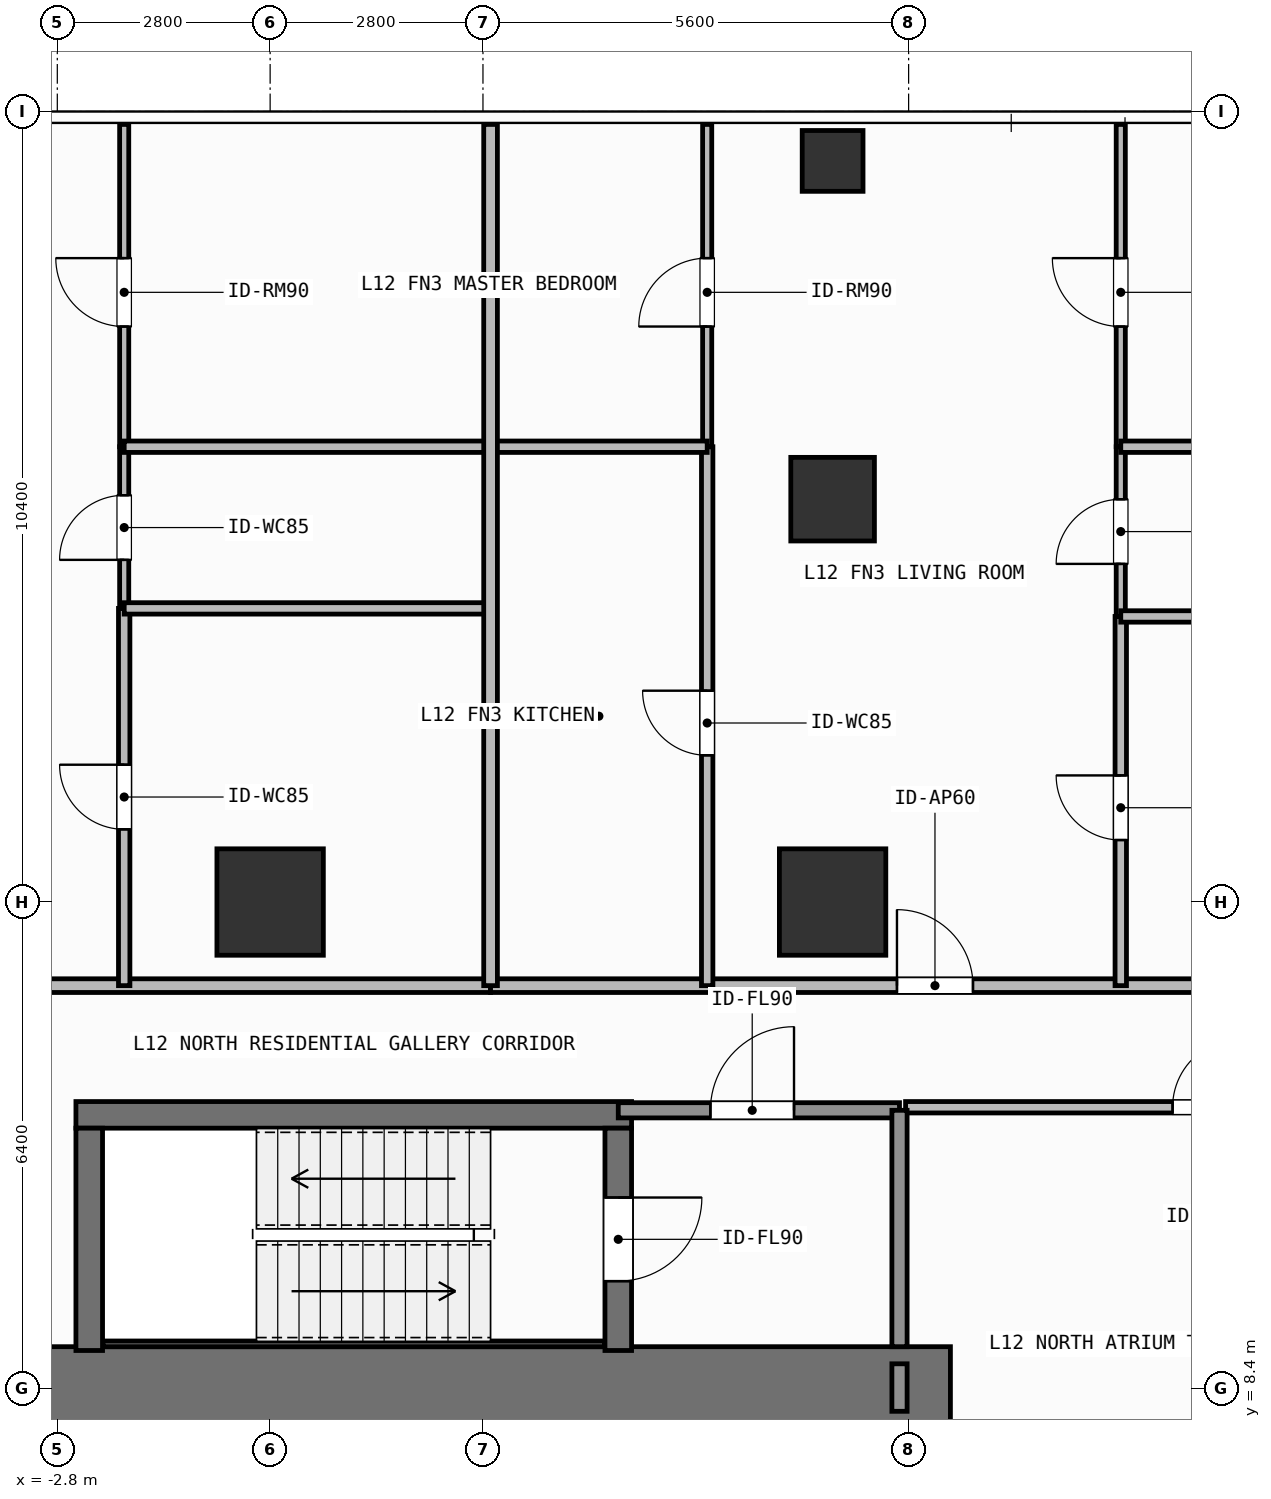
"""IFC4 building model, lengths in metres.
Left out: names, types, materials, properties, quantities, classifications, styles, units other than length and angle.
Written with IfcOpenShell. Run it as: python <this file> out.ifc"""

import sys

from ifc_helpers import new_model, si_unit, direction, frame, frame_2d, origin, origin_2d, place, context, subcontext, project, spatial, rectangle, hollow_rectangle, extrude, element, fill, save


model = new_model("IFC4")
c1 = context("Model", 3, precision=1e-05, world=origin(), true_north=direction((0.0, 1.0)))
c2 = subcontext(c1, "Body", "Model", "MODEL_VIEW")
j1 = project(units=[si_unit("LENGTHUNIT", "METRE"), si_unit("PLANEANGLEUNIT", "RADIAN")], contexts=[c1])
p1 = place(None, origin())
s1 = spatial("IfcSite", under=j1, at=p1, CompositionType="ELEMENT")
p2 = place(p1, origin())
s2 = spatial("IfcBuilding", under=s1, at=p2, CompositionType="ELEMENT")
p3 = place(p2, frame((0.0, 0.0, 46.2)))
s3 = spatial("IfcBuildingStorey", under=s2, at=p3, CompositionType="ELEMENT", Elevation=46.2)
p4 = place(p3, frame((-7.55, 8.4, 0.0), z_axis=(0.0, 0.0, 1.0), x_axis=(1.0, 0.0, 0.0)))
e1 = element("IfcWall", 1, at=p4, inside=s3, PredefinedType="SHEAR", context=c2, shape_type="SweptSolid", body=[
    extrude(rectangle(XDim=16.5, YDim=1.1, at=frame_2d((8.25, 0.0))), origin(), (0.0, 0.0, 1.0), 3.9),
])
p5 = place(p3, frame((-2.555, 12.0, 0.0), z_axis=(0.0, 0.0, 1.0), x_axis=(1.0, 0.0, 0.0)))
e2 = element("IfcWall", 2, at=p5, inside=s3, PredefinedType="SHEAR", context=c2, shape_type="SweptSolid", body=[
    extrude(rectangle(XDim=7.31, YDim=0.35, at=frame_2d((3.655, 0.0))), origin(), (0.0, 0.0, 1.0), 3.9),
])
p6 = place(p3, frame((-2.2, 8.988, 0.0), z_axis=(0.0, 0.0, 1.0), x_axis=(1.0, 0.0, 0.0)))
e3 = element("IfcWall", 3, at=p6, inside=s3, PredefinedType="SHEAR", context=c2, shape_type="SweptSolid", body=[
    extrude(rectangle(XDim=6.6, YDim=0.075, at=frame_2d((3.3, 0.0))), origin(), (0.0, 0.0, 1.0), 3.9),
])
p7 = place(p3, frame((-2.38, 8.9, 0.0), z_axis=(0.0, 0.0, 1.0), x_axis=(0.0, 1.0, 0.0)))
e4 = element("IfcWall", 4, at=p7, inside=s3, PredefinedType="SHEAR", context=c2, shape_type="SweptSolid", body=[
    extrude(rectangle(XDim=2.925, YDim=0.35, at=frame_2d((1.462, 0.0))), origin(), (0.0, 0.0, 1.0), 3.9),
])
p8 = place(p3, frame((4.58, 11.825, 0.0), z_axis=(0.0, 0.0, 1.0), x_axis=(0.0, -1.0, 0.0)))
e5 = element("IfcWall", 5, at=p8, inside=s3, PredefinedType="SHEAR", context=c2, shape_type="SweptSolid", body=[
    extrude(rectangle(XDim=2.925, YDim=0.35, at=frame_2d((1.462, 0.0))), origin(), (0.0, 0.0, 1.0), 3.9),
])
p9 = place(p8, frame((0.913, 0.0, 0.0)))
e6 = element("IfcOpeningElement", 6, at=p9, cuts=e5, PredefinedType="OPENING", context=c2, shape_type="SweptSolid", body=[
    extrude(rectangle(XDim=1.1, YDim=2.15, at=frame_2d((0.55, 1.075))), frame((0.0, 0.185, 0.0), z_axis=(0.0, -1.0, 0.0), x_axis=(1.0, 0.0, 0.0)), (0.0, 0.0, 1.0), 0.37),
])
for number, where, z_axis, x_axis in (
    (7, (0.0, 14.8, 0.0), (0.0, 0.0, 1.0), (1.0, 0.0, 0.0)),
    (8, (7.4, 14.8, 0.0), (0.0, 0.0, 1.0), (1.0, 0.0, 0.0)),
):
    element("IfcColumn", number, at=place(p3, frame(where, z_axis=z_axis, x_axis=x_axis)), inside=s3, PredefinedType="COLUMN", context=c2, shape_type="SweptSolid", body=[
        extrude(rectangle(XDim=1.4, YDim=1.4, at=origin_2d()), origin(), (0.0, 0.0, 1.0), 3.9),
    ])
p10 = place(p3, frame((7.4, 20.1, 0.0), z_axis=(0.0, 0.0, 1.0), x_axis=(1.0, 0.0, 0.0)))
e9 = element("IfcColumn", 9, at=p10, inside=s3, PredefinedType="COLUMN", context=c2, shape_type="SweptSolid", body=[
    extrude(rectangle(XDim=1.1, YDim=1.1, at=origin_2d()), origin(), (0.0, 0.0, 1.0), 3.9),
])
p11 = place(p3, frame((7.4, 24.55, 0.0), z_axis=(0.0, 0.0, 1.0), x_axis=(1.0, 0.0, 0.0)))
e10 = element("IfcColumn", 10, at=p11, inside=s3, PredefinedType="COLUMN", context=c2, shape_type="SweptSolid", body=[
    extrude(hollow_rectangle(XDim=0.8, YDim=0.8, WallThickness=0.036, at=origin_2d()), origin(), (0.0, 0.0, 1.0), 3.9),
])
p12 = place(p3, frame((4.58, 12.06, 0.0), z_axis=(0.0, 0.0, 1.0), x_axis=(1.0, 0.0, 0.0)))
e11 = element("IfcWall", 11, at=p12, inside=s3, PredefinedType="SOLIDWALL", context=c2, shape_type="SweptSolid", body=[
    extrude(rectangle(XDim=3.7, YDim=0.2, at=frame_2d((1.85, 0.0))), origin(), (0.0, 0.0, 1.0), 3.68),
])
p13 = place(p12, frame((1.212, 0.0, 0.0)))
e12 = element("IfcOpeningElement", 12, at=p13, cuts=e11, PredefinedType="OPENING", context=c2, shape_type="SweptSolid", body=[
    extrude(rectangle(XDim=1.1, YDim=2.15, at=frame_2d((0.55, 1.075))), frame((0.0, 0.11, 0.0), z_axis=(0.0, -1.0, 0.0), x_axis=(1.0, 0.0, 0.0)), (0.0, 0.0, 1.0), 0.22),
])
p14 = place(p3, frame((8.36, 12.1, 0.0), z_axis=(0.0, 0.0, 1.0), x_axis=(1.0, 0.0, 0.0)))
e13 = element("IfcWall", 13, at=p14, inside=s3, PredefinedType="PARTITIONING", context=c2, shape_type="SweptSolid", body=[
    extrude(rectangle(XDim=7.22, YDim=0.15, at=frame_2d((3.61, 0.0))), origin(), (0.0, 0.0, 1.0), 3.68),
])
p15 = place(p14, frame((3.513, 0.0, 0.0)))
e14 = element("IfcOpeningElement", 14, at=p15, cuts=e13, PredefinedType="OPENING", context=c2, shape_type="SweptSolid", body=[
    extrude(rectangle(XDim=0.9, YDim=2.1, at=frame_2d((0.45, 1.05))), frame((0.0, 0.085, 0.0), z_axis=(0.0, -1.0, 0.0), x_axis=(1.0, 0.0, 0.0)), (0.0, 0.0, 1.0), 0.17),
])
p16 = place(p3, frame((-9.151, 13.7, 0.0), z_axis=(0.0, 0.0, 1.0), x_axis=(1.0, 0.0, 0.0)))
e15 = element("IfcWall", 15, at=p16, inside=s3, PredefinedType="PARTITIONING", context=c2, shape_type="SweptSolid", body=[
    extrude(rectangle(XDim=12.051, YDim=0.18, at=frame_2d((6.025, 0.0))), origin(), (0.0, 0.0, 1.0), 3.68),
])
p17 = place(p16, frame((4.989, 0.0, 0.0)))
e16 = element("IfcOpeningElement", 16, at=p17, cuts=e15, PredefinedType="OPENING", context=c2, shape_type="SweptSolid", body=[
    extrude(rectangle(XDim=1.0, YDim=2.2, at=frame_2d((0.5, 1.1))), frame((0.0, 0.1, 0.0), z_axis=(0.0, -1.0, 0.0), x_axis=(1.0, 0.0, 0.0)), (0.0, 0.0, 1.0), 0.2),
])
p18 = place(p3, frame((-1.92, 13.7, 0.0), z_axis=(0.0, 0.0, 1.0), x_axis=(0.0, 1.0, 0.0)))
e17 = element("IfcWall", 17, at=p18, inside=s3, PredefinedType="PARTITIONING", context=c2, shape_type="SweptSolid", body=[
    extrude(rectangle(XDim=4.963, YDim=0.15, at=frame_2d((2.481, 0.0))), origin(), (0.0, 0.0, 1.0), 3.68),
])
p19 = place(p18, frame((2.056, 0.0, 0.0)))
e18 = element("IfcOpeningElement", 18, at=p19, cuts=e17, PredefinedType="OPENING", context=c2, shape_type="SweptSolid", body=[
    extrude(rectangle(XDim=0.85, YDim=2.1, at=frame_2d((0.425, 1.05))), frame((0.0, 0.085, 0.0), z_axis=(0.0, -1.0, 0.0), x_axis=(1.0, 0.0, 0.0)), (0.0, 0.0, 1.0), 0.17),
])
p20 = place(p3, frame((-1.92, 18.663, 0.0), z_axis=(0.0, 0.0, 1.0), x_axis=(0.0, 1.0, 0.0)))
e19 = element("IfcWall", 19, at=p20, inside=s3, PredefinedType="PARTITIONING", context=c2, shape_type="SweptSolid", body=[
    extrude(rectangle(XDim=2.127, YDim=0.12, at=frame_2d((1.063, 0.0))), origin(), (0.0, 0.0, 1.0), 3.68),
])
p21 = place(p20, frame((0.638, 0.0, 0.0)))
e20 = element("IfcOpeningElement", 20, at=p21, cuts=e19, PredefinedType="OPENING", context=c2, shape_type="SweptSolid", body=[
    extrude(rectangle(XDim=0.85, YDim=2.1, at=frame_2d((0.425, 1.05))), frame((0.0, 0.07, 0.0), z_axis=(0.0, -1.0, 0.0), x_axis=(1.0, 0.0, 0.0)), (0.0, 0.0, 1.0), 0.14),
])
p22 = place(p3, frame((-1.92, 20.79, 0.0), z_axis=(0.0, 0.0, 1.0), x_axis=(0.0, 1.0, 0.0)))
e21 = element("IfcWall", 21, at=p22, inside=s3, PredefinedType="PARTITIONING", context=c2, shape_type="SweptSolid", body=[
    extrude(rectangle(XDim=4.24, YDim=0.12, at=frame_2d((2.12, 0.0))), origin(), (0.0, 0.0, 1.0), 3.68),
])
p23 = place(p22, frame((1.581, 0.0, 0.0)))
e22 = element("IfcOpeningElement", 22, at=p23, cuts=e21, PredefinedType="OPENING", context=c2, shape_type="SweptSolid", body=[
    extrude(rectangle(XDim=0.9, YDim=2.1, at=frame_2d((0.45, 1.05))), frame((0.0, 0.07, 0.0), z_axis=(0.0, -1.0, 0.0), x_axis=(1.0, 0.0, 0.0)), (0.0, 0.0, 1.0), 0.14),
])
p24 = place(p3, frame((2.9, 13.7, 0.0), z_axis=(0.0, 0.0, 1.0), x_axis=(1.0, 0.0, 0.0)))
e23 = element("IfcWall", 23, at=p24, inside=s3, PredefinedType="PARTITIONING", context=c2, shape_type="SweptSolid", body=[
    extrude(rectangle(XDim=12.051, YDim=0.18, at=frame_2d((6.025, 0.0))), origin(), (0.0, 0.0, 1.0), 3.68),
])
p25 = place(p24, frame((5.347, 0.0, 0.0)))
e24 = element("IfcOpeningElement", 24, at=p25, cuts=e23, PredefinedType="OPENING", context=c2, shape_type="SweptSolid", body=[
    extrude(rectangle(XDim=1.0, YDim=2.2, at=frame_2d((0.5, 1.1))), frame((0.0, 0.1, 0.0), z_axis=(0.0, -1.0, 0.0), x_axis=(1.0, 0.0, 0.0)), (0.0, 0.0, 1.0), 0.2),
])
p26 = place(p3, frame((5.75, 13.7, 0.0), z_axis=(0.0, 0.0, 1.0), x_axis=(0.0, 1.0, 0.0)))
e25 = element("IfcWall", 25, at=p26, inside=s3, PredefinedType="PARTITIONING", context=c2, shape_type="SweptSolid", body=[
    extrude(rectangle(XDim=7.09, YDim=0.15, at=frame_2d((3.545, 0.0))), origin(), (0.0, 0.0, 1.0), 3.68),
])
p27 = place(p26, frame((3.03, 0.0, 0.0)))
e26 = element("IfcOpeningElement", 26, at=p27, cuts=e25, PredefinedType="OPENING", context=c2, shape_type="SweptSolid", body=[
    extrude(rectangle(XDim=0.85, YDim=2.1, at=frame_2d((0.425, 1.05))), frame((0.0, 0.085, 0.0), z_axis=(0.0, -1.0, 0.0), x_axis=(1.0, 0.0, 0.0)), (0.0, 0.0, 1.0), 0.17),
])
p28 = place(p3, frame((5.75, 20.79, 0.0), z_axis=(0.0, 0.0, 1.0), x_axis=(0.0, 1.0, 0.0)))
e27 = element("IfcWall", 27, at=p28, inside=s3, PredefinedType="PARTITIONING", context=c2, shape_type="SweptSolid", body=[
    extrude(rectangle(XDim=4.24, YDim=0.12, at=frame_2d((2.12, 0.0))), origin(), (0.0, 0.0, 1.0), 3.68),
])
p29 = place(p28, frame((1.581, 0.0, 0.0)))
e28 = element("IfcOpeningElement", 28, at=p29, cuts=e27, PredefinedType="OPENING", context=c2, shape_type="SweptSolid", body=[
    extrude(rectangle(XDim=0.9, YDim=2.1, at=frame_2d((0.45, 1.05))), frame((0.0, 0.07, 0.0), z_axis=(0.0, -1.0, 0.0), x_axis=(1.0, 0.0, 0.0)), (0.0, 0.0, 1.0), 0.14),
])
p30 = place(p3, frame((11.191, 13.7, 0.0), z_axis=(0.0, 0.0, 1.0), x_axis=(0.0, 1.0, 0.0)))
e29 = element("IfcWall", 29, at=p30, inside=s3, PredefinedType="PARTITIONING", context=c2, shape_type="SweptSolid", body=[
    extrude(rectangle(XDim=4.857, YDim=0.15, at=frame_2d((2.428, 0.0))), origin(), (0.0, 0.0, 1.0), 3.68),
])
p31 = place(p30, frame((1.916, 0.0, 0.0)))
e30 = element("IfcOpeningElement", 30, at=p31, cuts=e29, PredefinedType="OPENING", context=c2, shape_type="SweptSolid", body=[
    extrude(rectangle(XDim=0.85, YDim=2.1, at=frame_2d((0.425, 1.05))), frame((0.0, 0.085, 0.0), z_axis=(0.0, -1.0, 0.0), x_axis=(1.0, 0.0, 0.0)), (0.0, 0.0, 1.0), 0.17),
])
p32 = place(p3, frame((11.191, 18.557, 0.0), z_axis=(0.0, 0.0, 1.0), x_axis=(0.0, 1.0, 0.0)))
e31 = element("IfcWall", 31, at=p32, inside=s3, PredefinedType="PARTITIONING", context=c2, shape_type="SweptSolid", body=[
    extrude(rectangle(XDim=2.233, YDim=0.12, at=frame_2d((1.117, 0.0))), origin(), (0.0, 0.0, 1.0), 3.37),
])
p33 = place(p32, frame((0.691, 0.0, 0.0)))
e32 = element("IfcOpeningElement", 32, at=p33, cuts=e31, PredefinedType="OPENING", context=c2, shape_type="SweptSolid", body=[
    extrude(rectangle(XDim=0.85, YDim=2.1, at=frame_2d((0.425, 1.05))), frame((0.0, 0.07, 0.0), z_axis=(0.0, -1.0, 0.0), x_axis=(1.0, 0.0, 0.0)), (0.0, 0.0, 1.0), 0.14),
])
p34 = place(p3, frame((11.191, 20.79, 0.0), z_axis=(0.0, 0.0, 1.0), x_axis=(0.0, 1.0, 0.0)))
e33 = element("IfcWall", 33, at=p34, inside=s3, PredefinedType="PARTITIONING", context=c2, shape_type="SweptSolid", body=[
    extrude(rectangle(XDim=4.24, YDim=0.12, at=frame_2d((2.12, 0.0))), origin(), (0.0, 0.0, 1.0), 3.37),
])
p35 = place(p34, frame((1.581, 0.0, 0.0)))
e34 = element("IfcOpeningElement", 34, at=p35, cuts=e33, PredefinedType="OPENING", context=c2, shape_type="SweptSolid", body=[
    extrude(rectangle(XDim=0.9, YDim=2.1, at=frame_2d((0.45, 1.05))), frame((0.0, 0.07, 0.0), z_axis=(0.0, -1.0, 0.0), x_axis=(1.0, 0.0, 0.0)), (0.0, 0.0, 1.0), 0.14),
])
p36 = place(p3, frame((8.28, 8.95, 0.0), z_axis=(0.0, 0.0, 1.0), x_axis=(0.0, 1.0, 0.0)))
e35 = element("IfcWall", 35, at=p36, inside=s3, PredefinedType="SOLIDWALL", context=c2, shape_type="SweptSolid", body=[
    extrude(rectangle(XDim=3.11, YDim=0.2, at=frame_2d((1.555, 0.0))), origin(), (0.0, 0.0, 1.0), 3.68),
])
p37 = place(p3, frame((8.28, 8.1, 0.0), z_axis=(0.0, 0.0, 1.0), x_axis=(0.0, 1.0, 0.0)))
e36 = element("IfcWall", 36, at=p37, inside=s3, PredefinedType="SOLIDWALL", context=c2, shape_type="SweptSolid", body=[
    extrude(rectangle(XDim=0.625, YDim=0.2, at=frame_2d((0.312, 0.0))), origin(), (0.0, 0.0, 1.0), 3.68),
])
for number, where, z_axis, x_axis in (
    (37, (-1.92, 18.663, 0.0), (0.0, 0.0, 1.0), (1.0, 0.0, 0.0)),
    (38, (-1.92, 20.79, 0.0), (0.0, 0.0, 1.0), (1.0, 0.0, 0.0)),
):
    element("IfcWall", number, at=place(p3, frame(where, z_axis=z_axis, x_axis=x_axis)), inside=s3, PredefinedType="PARTITIONING", context=c2, shape_type="SweptSolid", body=[
        extrude(rectangle(XDim=4.82, YDim=0.15, at=frame_2d((2.41, 0.0))), origin(), (0.0, 0.0, 1.0), 3.68),
    ])
p38 = place(p3, frame((2.9, 20.79, 0.0), z_axis=(0.0, 0.0, 1.0), x_axis=(1.0, 0.0, 0.0)))
e39 = element("IfcWall", 39, at=p38, inside=s3, PredefinedType="PARTITIONING", context=c2, shape_type="SweptSolid", body=[
    extrude(rectangle(XDim=2.85, YDim=0.15, at=frame_2d((1.425, 0.0))), origin(), (0.0, 0.0, 1.0), 3.68),
])
for number, where, z_axis, x_axis in (
    (40, (11.191, 18.557, 0.0), (0.0, 0.0, 1.0), (1.0, 0.0, 0.0)),
    (41, (11.191, 20.79, 0.0), (0.0, 0.0, 1.0), (1.0, 0.0, 0.0)),
):
    element("IfcWall", number, at=place(p3, frame(where, z_axis=z_axis, x_axis=x_axis)), inside=s3, PredefinedType="PARTITIONING", context=c2, shape_type="SweptSolid", body=[
        extrude(rectangle(XDim=3.76, YDim=0.15, at=frame_2d((1.88, 0.0))), origin(), (0.0, 0.0, 1.0), 3.68),
    ])
p39 = place(p3, frame((2.9, 13.7, 0.0), z_axis=(0.0, 0.0, 1.0), x_axis=(0.0, 1.0, 0.0)))
e42 = element("IfcWall", 42, at=p39, inside=s3, PredefinedType="PARTITIONING", context=c2, shape_type="SweptSolid", body=[
    extrude(rectangle(XDim=11.33, YDim=0.18, at=frame_2d((5.665, 0.0))), origin(), (0.0, 0.0, 1.0), 3.68),
])
p40 = place(p9, origin())
e43 = element("IfcDoor", 43, at=p40, inside=s3, OperationType="SINGLE_SWING_LEFT", PredefinedType="DOOR", context=c2, shape_type="SweptSolid", body=[
    extrude(rectangle(XDim=1.1, YDim=2.15, at=frame_2d((0.55, 1.075))), frame((0.0, 0.025, 0.0), z_axis=(0.0, -1.0, 0.0), x_axis=(1.0, 0.0, 0.0)), (0.0, 0.0, 1.0), 0.05),
])
fill(e6, e43)
p41 = place(p13, origin())
e44 = element("IfcDoor", 44, at=p41, inside=s3, OperationType="SINGLE_SWING_RIGHT", PredefinedType="DOOR", context=c2, shape_type="SweptSolid", body=[
    extrude(rectangle(XDim=1.1, YDim=2.15, at=frame_2d((0.55, 1.075))), frame((0.0, 0.025, 0.0), z_axis=(0.0, -1.0, 0.0), x_axis=(1.0, 0.0, 0.0)), (0.0, 0.0, 1.0), 0.05),
])
fill(e12, e44)
p42 = place(p15, origin())
e45 = element("IfcDoor", 45, at=p42, inside=s3, OperationType="SINGLE_SWING_RIGHT", PredefinedType="DOOR", context=c2, shape_type="SweptSolid", body=[
    extrude(rectangle(XDim=0.9, YDim=2.1, at=frame_2d((0.45, 1.05))), frame((0.0, 0.025, 0.0), z_axis=(0.0, -1.0, 0.0), x_axis=(1.0, 0.0, 0.0)), (0.0, 0.0, 1.0), 0.05),
])
fill(e14, e45)
p43 = place(p19, origin())
e46 = element("IfcDoor", 46, at=p43, inside=s3, OperationType="SINGLE_SWING_RIGHT", PredefinedType="DOOR", context=c2, shape_type="SweptSolid", body=[
    extrude(rectangle(XDim=0.85, YDim=2.1, at=frame_2d((0.425, 1.05))), frame((0.0, 0.025, 0.0), z_axis=(0.0, -1.0, 0.0), x_axis=(1.0, 0.0, 0.0)), (0.0, 0.0, 1.0), 0.05),
])
fill(e18, e46)
p44 = place(p21, origin())
e47 = element("IfcDoor", 47, at=p44, inside=s3, OperationType="SINGLE_SWING_LEFT", PredefinedType="DOOR", context=c2, shape_type="SweptSolid", body=[
    extrude(rectangle(XDim=0.85, YDim=2.1, at=frame_2d((0.425, 1.05))), frame((0.0, 0.025, 0.0), z_axis=(0.0, -1.0, 0.0), x_axis=(1.0, 0.0, 0.0)), (0.0, 0.0, 1.0), 0.05),
])
fill(e20, e47)
p45 = place(p23, origin())
e48 = element("IfcDoor", 48, at=p45, inside=s3, OperationType="SINGLE_SWING_RIGHT", PredefinedType="DOOR", context=c2, shape_type="SweptSolid", body=[
    extrude(rectangle(XDim=0.9, YDim=2.1, at=frame_2d((0.45, 1.05))), frame((0.0, 0.025, 0.0), z_axis=(0.0, -1.0, 0.0), x_axis=(1.0, 0.0, 0.0)), (0.0, 0.0, 1.0), 0.05),
])
fill(e22, e48)
p46 = place(p25, origin())
e49 = element("IfcDoor", 49, at=p46, inside=s3, OperationType="SINGLE_SWING_LEFT", PredefinedType="DOOR", context=c2, shape_type="SweptSolid", body=[
    extrude(rectangle(XDim=1.0, YDim=2.2, at=frame_2d((0.5, 1.1))), frame((0.0, 0.025, 0.0), z_axis=(0.0, -1.0, 0.0), x_axis=(1.0, 0.0, 0.0)), (0.0, 0.0, 1.0), 0.05),
])
fill(e24, e49)
p47 = place(p27, origin())
e50 = element("IfcDoor", 50, at=p47, inside=s3, OperationType="SINGLE_SWING_RIGHT", PredefinedType="DOOR", context=c2, shape_type="SweptSolid", body=[
    extrude(rectangle(XDim=0.85, YDim=2.1, at=frame_2d((0.425, 1.05))), frame((0.0, 0.025, 0.0), z_axis=(0.0, -1.0, 0.0), x_axis=(1.0, 0.0, 0.0)), (0.0, 0.0, 1.0), 0.05),
])
fill(e26, e50)
p48 = place(p29, origin())
e51 = element("IfcDoor", 51, at=p48, inside=s3, OperationType="SINGLE_SWING_LEFT", PredefinedType="DOOR", context=c2, shape_type="SweptSolid", body=[
    extrude(rectangle(XDim=0.9, YDim=2.1, at=frame_2d((0.45, 1.05))), frame((0.0, 0.025, 0.0), z_axis=(0.0, -1.0, 0.0), x_axis=(1.0, 0.0, 0.0)), (0.0, 0.0, 1.0), 0.05),
])
fill(e28, e51)
p49 = place(p31, origin())
e52 = element("IfcDoor", 52, at=p49, inside=s3, OperationType="SINGLE_SWING_RIGHT", PredefinedType="DOOR", context=c2, shape_type="SweptSolid", body=[
    extrude(rectangle(XDim=0.85, YDim=2.1, at=frame_2d((0.425, 1.05))), frame((0.0, 0.025, 0.0), z_axis=(0.0, -1.0, 0.0), x_axis=(1.0, 0.0, 0.0)), (0.0, 0.0, 1.0), 0.05),
])
fill(e30, e52)
p50 = place(p33, origin())
e53 = element("IfcDoor", 53, at=p50, inside=s3, OperationType="SINGLE_SWING_LEFT", PredefinedType="DOOR", context=c2, shape_type="SweptSolid", body=[
    extrude(rectangle(XDim=0.85, YDim=2.1, at=frame_2d((0.425, 1.05))), frame((0.0, 0.025, 0.0), z_axis=(0.0, -1.0, 0.0), x_axis=(1.0, 0.0, 0.0)), (0.0, 0.0, 1.0), 0.05),
])
fill(e32, e53)
p51 = place(p35, origin())
e54 = element("IfcDoor", 54, at=p51, inside=s3, OperationType="SINGLE_SWING_RIGHT", PredefinedType="DOOR", context=c2, shape_type="SweptSolid", body=[
    extrude(rectangle(XDim=0.9, YDim=2.1, at=frame_2d((0.45, 1.05))), frame((0.0, 0.025, 0.0), z_axis=(0.0, -1.0, 0.0), x_axis=(1.0, 0.0, 0.0)), (0.0, 0.0, 1.0), 0.05),
])
fill(e34, e54)
save(model, sys.argv[1])
